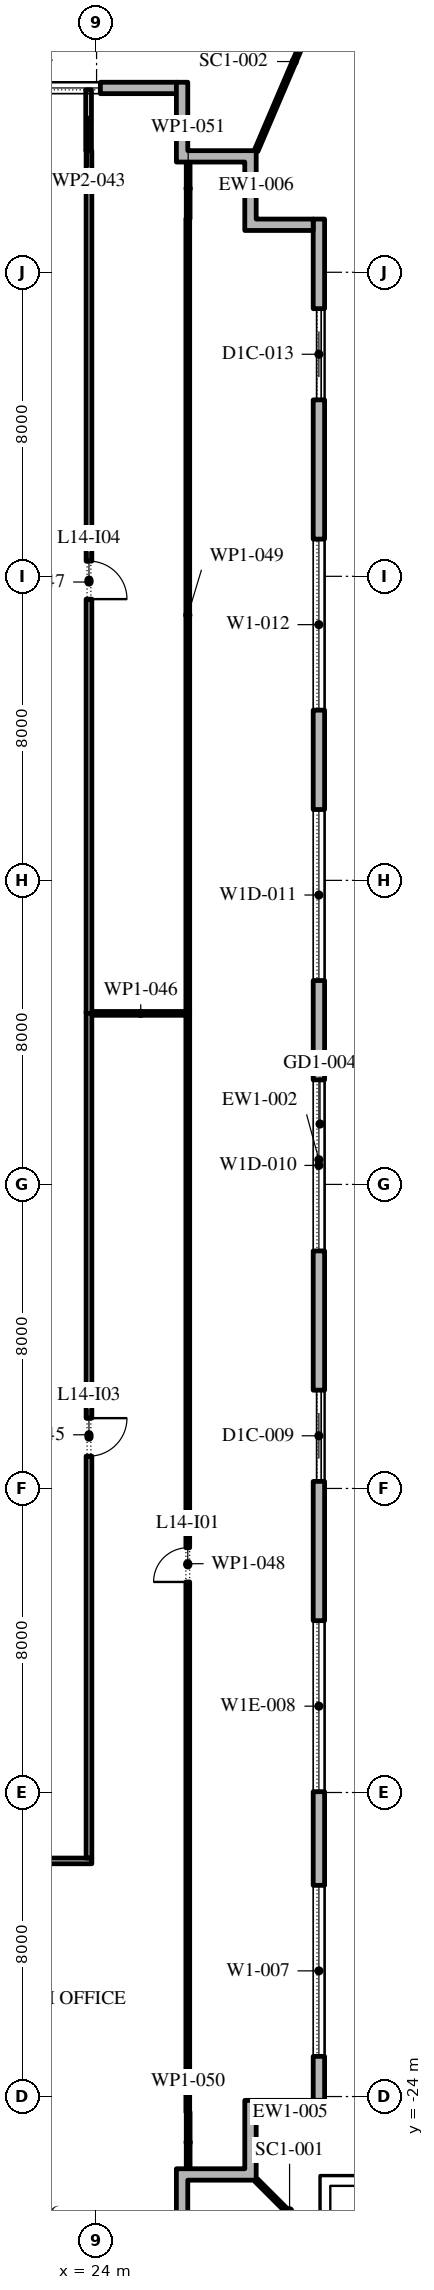
"""IFC4 building model, lengths in metres.
Left out: names, types, materials, properties, quantities, classifications, styles, units other than length and angle.
Written with IfcOpenShell. Run it as: python <this file> out.ifc"""

import sys

from ifc_helpers import new_model, si_unit, direction, frame, frame_2d, origin, place, context, subcontext, project, spatial, polyline, rectangle, outline, extrude, element, fill, save


model = new_model("IFC4")
c1 = context("Model", 3, precision=1e-05, world=origin(), true_north=direction((0.0, 1.0)))
c2 = subcontext(c1, "Body", "Model", "MODEL_VIEW")
j1 = project(units=[si_unit("LENGTHUNIT", "METRE"), si_unit("PLANEANGLEUNIT", "RADIAN")], contexts=[c1])
p1 = place(None, origin())
s1 = spatial("IfcSite", under=j1, at=p1, CompositionType="ELEMENT")
p2 = place(p1, origin())
s2 = spatial("IfcBuilding", under=s1, at=p2, CompositionType="ELEMENT")
p3 = place(p2, frame((0.0, 0.0, 69.0)))
s3 = spatial("IfcBuildingStorey", under=s2, at=p3, CompositionType="ELEMENT", Elevation=69.0)
p4 = place(p3, frame((29.85, -24.1, 0.0), z_axis=(0.0, 0.0, 1.0), x_axis=(0.0, 1.0, 0.0)))
e1 = element("IfcWall", 1, at=p4, inside=s3, PredefinedType="STANDARD", context=c2, shape_type="SweptSolid", body=[
    extrude(rectangle(XDim=49.5, YDim=0.3, at=frame_2d((24.75, 0.0))), origin(), (0.0, 0.0, 1.0), 4.0),
])
p5 = place(p4, frame((1.157, 0.0, 0.45)))
e2 = element("IfcOpeningElement", 2, at=p5, cuts=e1, PredefinedType="OPENING", context=c2, shape_type="SweptSolid", body=[
    extrude(rectangle(XDim=4.5, YDim=3.05, at=frame_2d((2.25, 1.525))), frame((0.0, 0.16, 0.0), z_axis=(0.0, -1.0, 0.0), x_axis=(1.0, 0.0, 0.0)), (0.0, 0.0, 1.0), 0.32),
])
p6 = place(p4, frame((8.121, 0.0, 0.45)))
e3 = element("IfcOpeningElement", 3, at=p6, cuts=e1, PredefinedType="OPENING", context=c2, shape_type="SweptSolid", body=[
    extrude(rectangle(XDim=4.5, YDim=2.825, at=frame_2d((2.25, 1.413))), frame((0.0, 0.16, 0.0), z_axis=(0.0, -1.0, 0.0), x_axis=(1.0, 0.0, 0.0)), (0.0, 0.0, 1.0), 0.32),
])
p7 = place(p4, frame((16.286, 0.0, 0.0)))
e4 = element("IfcOpeningElement", 4, at=p7, cuts=e1, PredefinedType="OPENING", context=c2, shape_type="SweptSolid", body=[
    extrude(rectangle(XDim=2.4, YDim=3.325, at=frame_2d((1.2, 1.663))), frame((0.0, 0.16, 0.0), z_axis=(0.0, -1.0, 0.0), x_axis=(1.0, 0.0, 0.0)), (0.0, 0.0, 1.0), 0.32),
])
p8 = place(p4, frame((22.35, 0.0, 0.45)))
e5 = element("IfcOpeningElement", 5, at=p8, cuts=e1, PredefinedType="OPENING", context=c2, shape_type="SweptSolid", body=[
    extrude(rectangle(XDim=4.5, YDim=2.875, at=frame_2d((2.25, 1.438))), frame((0.0, 0.16, 0.0), z_axis=(0.0, -1.0, 0.0), x_axis=(1.0, 0.0, 0.0)), (0.0, 0.0, 1.0), 0.32),
])
p9 = place(p4, frame((29.464, 0.0, 0.45)))
e6 = element("IfcOpeningElement", 6, at=p9, cuts=e1, PredefinedType="OPENING", context=c2, shape_type="SweptSolid", body=[
    extrude(rectangle(XDim=4.5, YDim=2.875, at=frame_2d((2.25, 1.438))), frame((0.0, 0.16, 0.0), z_axis=(0.0, -1.0, 0.0), x_axis=(1.0, 0.0, 0.0)), (0.0, 0.0, 1.0), 0.32),
])
p10 = place(p4, frame((36.579, 0.0, 0.45)))
e7 = element("IfcOpeningElement", 7, at=p10, cuts=e1, PredefinedType="OPENING", context=c2, shape_type="SweptSolid", body=[
    extrude(rectangle(XDim=4.5, YDim=3.05, at=frame_2d((2.25, 1.525))), frame((0.0, 0.16, 0.0), z_axis=(0.0, -1.0, 0.0), x_axis=(1.0, 0.0, 0.0)), (0.0, 0.0, 1.0), 0.32),
])
p11 = place(p4, frame((44.743, 0.0, 0.0)))
e8 = element("IfcOpeningElement", 8, at=p11, cuts=e1, PredefinedType="OPENING", context=c2, shape_type="SweptSolid", body=[
    extrude(rectangle(XDim=2.4, YDim=3.325, at=frame_2d((1.2, 1.663))), frame((0.0, 0.16, 0.0), z_axis=(0.0, -1.0, 0.0), x_axis=(1.0, 0.0, 0.0)), (0.0, 0.0, 1.0), 0.32),
])
p12 = place(p3, frame((26.1, 28.85, 0.0), z_axis=(0.0, 0.0, 1.0), x_axis=(-1.0, 0.0, 0.0)))
e9 = element("IfcWall", 9, at=p12, inside=s3, PredefinedType="STANDARD", context=c2, shape_type="SweptSolid", body=[
    extrude(rectangle(XDim=52.5, YDim=0.3, at=frame_2d((26.25, 0.0))), origin(), (0.0, 0.0, 1.0), 4.0),
])
p13 = place(p12, frame((2.0, 0.0, 0.45)))
e10 = element("IfcOpeningElement", 10, at=p13, cuts=e9, PredefinedType="OPENING", context=c2, shape_type="SweptSolid", body=[
    extrude(rectangle(XDim=4.5, YDim=2.95, at=frame_2d((2.25, 1.475))), frame((0.0, 0.16, 0.0), z_axis=(0.0, -1.0, 0.0), x_axis=(1.0, 0.0, 0.0)), (0.0, 0.0, 1.0), 0.32),
])
p14 = place(p12, frame((10.65, 0.0, 0.45)))
e11 = element("IfcOpeningElement", 11, at=p14, cuts=e9, PredefinedType="OPENING", context=c2, shape_type="SweptSolid", body=[
    extrude(rectangle(XDim=4.5, YDim=2.95, at=frame_2d((2.25, 1.475))), frame((0.0, 0.16, 0.0), z_axis=(0.0, -1.0, 0.0), x_axis=(1.0, 0.0, 0.0)), (0.0, 0.0, 1.0), 0.32),
])
p15 = place(p12, frame((20.5, 0.0, 0.0)))
e12 = element("IfcOpeningElement", 12, at=p15, cuts=e9, PredefinedType="OPENING", context=c2, shape_type="SweptSolid", body=[
    extrude(rectangle(XDim=2.4, YDim=3.5, at=frame_2d((1.2, 1.75))), frame((0.0, 0.16, 0.0), z_axis=(0.0, -1.0, 0.0), x_axis=(1.0, 0.0, 0.0)), (0.0, 0.0, 1.0), 0.32),
])
p16 = place(p12, frame((28.25, 0.0, 0.45)))
e13 = element("IfcOpeningElement", 13, at=p16, cuts=e9, PredefinedType="OPENING", context=c2, shape_type="SweptSolid", body=[
    extrude(rectangle(XDim=4.5, YDim=2.95, at=frame_2d((2.25, 1.475))), frame((0.0, 0.16, 0.0), z_axis=(0.0, -1.0, 0.0), x_axis=(1.0, 0.0, 0.0)), (0.0, 0.0, 1.0), 0.32),
])
p17 = place(p12, frame((37.05, 0.0, 0.45)))
e14 = element("IfcOpeningElement", 14, at=p17, cuts=e9, PredefinedType="OPENING", context=c2, shape_type="SweptSolid", body=[
    extrude(rectangle(XDim=4.5, YDim=2.95, at=frame_2d((2.25, 1.475))), frame((0.0, 0.16, 0.0), z_axis=(0.0, -1.0, 0.0), x_axis=(1.0, 0.0, 0.0)), (0.0, 0.0, 1.0), 0.32),
])
p18 = place(p12, frame((45.85, 0.0, 0.45)))
e15 = element("IfcOpeningElement", 15, at=p18, cuts=e9, PredefinedType="OPENING", context=c2, shape_type="SweptSolid", body=[
    extrude(rectangle(XDim=4.5, YDim=2.95, at=frame_2d((2.25, 1.475))), frame((0.0, 0.16, 0.0), z_axis=(0.0, -1.0, 0.0), x_axis=(1.0, 0.0, 0.0)), (0.0, 0.0, 1.0), 0.32),
])
p19 = place(p3, origin())
e16 = element("IfcWall", 16, at=p19, inside=s3, PredefinedType="STANDARD", context=c2, shape_type="SweptSolid", body=[
    extrude(outline(polyline([(27.9, -25.9), (27.9, -24.1), (30.0, -24.1), (30.0, -24.4), (28.2, -24.4), (28.2, -26.2), (26.4, -26.2), (26.4, -27.7), (26.1, -27.7), (26.1, -25.9), (27.9, -25.9)])), origin(), (0.0, 0.0, 1.0), 4.0),
])
p20 = place(p3, origin())
e17 = element("IfcWall", 17, at=p20, inside=s3, PredefinedType="STANDARD", context=c2, shape_type="SweptSolid", body=[
    extrude(outline(polyline([(27.9, 26.9), (26.1, 26.9), (26.1, 29.0), (26.4, 29.0), (26.4, 27.2), (28.2, 27.2), (28.2, 25.4), (29.7, 25.4), (29.7, 25.1), (27.9, 25.1), (27.9, 26.9)])), origin(), (0.0, 0.0, 1.0), 4.0),
])
p21 = place(p3, frame((28.2, -26.2, -0.05), z_axis=(0.0, 0.0, 1.0), x_axis=(0.707106781187, -0.707106781187, 0.0)))
e18 = element("IfcWall", 18, at=p21, inside=s3, PredefinedType="STANDARD", context=c2, shape_type="SweptSolid", body=[
    extrude(rectangle(XDim=2.385, YDim=0.1, at=frame_2d((1.192, 0.0))), origin(), (0.0, 0.0, 1.0), 4.05),
])
p22 = place(p3, frame((28.2, 27.2, -0.05), z_axis=(0.0, 0.0, 1.0), x_axis=(0.392826940341, 0.919612415609, 0.0)))
e19 = element("IfcWall", 19, at=p22, inside=s3, PredefinedType="STANDARD", context=c2, shape_type="SweptSolid", body=[
    extrude(rectangle(XDim=5.099, YDim=0.1, at=frame_2d((2.55, 0.0))), origin(), (0.0, 0.0, 1.0), 4.05),
])
p23 = place(p3, frame((23.79, 28.8, 0.0), z_axis=(0.0, 0.0, 1.0), x_axis=(0.0, -1.0, 0.0)))
e20 = element("IfcWall", 20, at=p23, inside=s3, PredefinedType="PARTITIONING", context=c2, shape_type="SweptSolid", body=[
    extrude(rectangle(XDim=1.6, YDim=0.15, at=frame_2d((0.8, 0.0))), origin(), (0.0, 0.0, 1.0), 4.0),
])
p24 = place(p3, frame((23.875, -17.8, 0.0), z_axis=(0.0, 0.0, 1.0), x_axis=(-1.0, 0.0, 0.0)))
e21 = element("IfcWall", 21, at=p24, inside=s3, PredefinedType="PARTITIONING", context=c2, shape_type="SweptSolid", body=[
    extrude(rectangle(XDim=6.275, YDim=0.15, at=frame_2d((3.137, 0.0))), origin(), (0.0, 0.0, 1.0), 4.0),
])
p25 = place(p3, frame((23.8, 4.55, 0.0), z_axis=(0.0, 0.0, 1.0), x_axis=(0.0, -1.0, 0.0)))
e22 = element("IfcWall", 22, at=p25, inside=s3, PredefinedType="PARTITIONING", context=c2, shape_type="SweptSolid", body=[
    extrude(rectangle(XDim=22.275, YDim=0.15, at=frame_2d((11.138, 0.0))), origin(), (0.0, 0.0, 1.0), 4.0),
])
p26 = place(p25, frame((10.7, 0.0, 0.0)))
e23 = element("IfcOpeningElement", 23, at=p26, cuts=e22, PredefinedType="OPENING", context=c2, shape_type="SweptSolid", body=[
    extrude(rectangle(XDim=1.0, YDim=2.1, at=frame_2d((0.5, 1.05))), frame((0.0, 0.085, 0.0), z_axis=(0.0, -1.0, 0.0), x_axis=(1.0, 0.0, 0.0)), (0.0, 0.0, 1.0), 0.17),
])
p27 = place(p3, frame((23.875, 4.5, 0.0), z_axis=(0.0, 0.0, 1.0), x_axis=(1.0, 0.0, 0.0)))
e24 = element("IfcWall", 24, at=p27, inside=s3, PredefinedType="PARTITIONING", context=c2, shape_type="SweptSolid", body=[
    extrude(rectangle(XDim=2.575, YDim=0.1, at=frame_2d((1.288, 0.0))), origin(), (0.0, 0.0, 1.0), 4.0),
])
p28 = place(p3, frame((23.8, 27.2, 0.0), z_axis=(0.0, 0.0, 1.0), x_axis=(0.0, -1.0, 0.0)))
e25 = element("IfcWall", 25, at=p28, inside=s3, PredefinedType="PARTITIONING", context=c2, shape_type="SweptSolid", body=[
    extrude(rectangle(XDim=22.7, YDim=0.15, at=frame_2d((11.35, 0.0))), origin(), (0.0, 0.0, 1.0), 4.0),
])
p29 = place(p28, frame((10.8, 0.0, 0.0)))
e26 = element("IfcOpeningElement", 26, at=p29, cuts=e25, PredefinedType="OPENING", context=c2, shape_type="SweptSolid", body=[
    extrude(rectangle(XDim=1.0, YDim=2.1, at=frame_2d((0.5, 1.05))), frame((0.0, 0.085, 0.0), z_axis=(0.0, -1.0, 0.0), x_axis=(1.0, 0.0, 0.0)), (0.0, 0.0, 1.0), 0.17),
])
p30 = place(p3, frame((26.4, -24.41, 0.0), z_axis=(0.0, 0.0, 1.0), x_axis=(0.0, 1.0, 0.0)))
e27 = element("IfcWall", 27, at=p30, inside=s3, PredefinedType="PARTITIONING", context=c2, shape_type="SweptSolid", body=[
    extrude(rectangle(XDim=28.86, YDim=0.1, at=frame_2d((14.43, 0.0))), origin(), (0.0, 0.0, 1.0), 4.0),
])
p31 = place(p30, frame((13.95, 0.0, 0.0)))
e28 = element("IfcOpeningElement", 28, at=p31, cuts=e27, PredefinedType="OPENING", context=c2, shape_type="SweptSolid", body=[
    extrude(rectangle(XDim=0.9, YDim=2.1, at=frame_2d((0.45, 1.05))), frame((0.0, 0.06, 0.0), z_axis=(0.0, -1.0, 0.0), x_axis=(1.0, 0.0, 0.0)), (0.0, 0.0, 1.0), 0.12),
])
p32 = place(p3, frame((26.4, 4.55, 0.0), z_axis=(0.0, 0.0, 1.0), x_axis=(0.0, 1.0, 0.0)))
e29 = element("IfcWall", 29, at=p32, inside=s3, PredefinedType="PARTITIONING", context=c2, shape_type="SweptSolid", body=[
    extrude(rectangle(XDim=20.86, YDim=0.1, at=frame_2d((10.43, 0.0))), origin(), (0.0, 0.0, 1.0), 4.0),
])
for number, where, z_axis, x_axis in (
    (30, (26.41, -26.0, 0.0), (0.0, 0.0, 1.0), (0.0, 1.0, 0.0)),
    (31, (26.41, 25.41, 0.0), (0.0, 0.0, 1.0), (0.0, 1.0, 0.0)),
):
    element("IfcWall", number, at=place(p3, frame(where, z_axis=z_axis, x_axis=x_axis)), inside=s3, PredefinedType="PARTITIONING", context=c2, shape_type="SweptSolid", body=[
        extrude(rectangle(XDim=1.59, YDim=0.1, at=frame_2d((0.795, 0.0))), origin(), (0.0, 0.0, 1.0), 4.0),
    ])
p33 = place(p5, origin())
e32 = element("IfcWindow", 32, at=p33, inside=s3, PartitioningType="DOUBLE_PANEL_VERTICAL", PredefinedType="WINDOW", context=c2, shape_type="SweptSolid", body=[
    extrude(rectangle(XDim=4.5, YDim=3.05, at=frame_2d((2.25, 1.525))), frame((0.0, 0.03, 0.0), z_axis=(0.0, -1.0, 0.0), x_axis=(1.0, 0.0, 0.0)), (0.0, 0.0, 1.0), 0.06),
])
fill(e2, e32)
p34 = place(p6, origin())
e33 = element("IfcWindow", 33, at=p34, inside=s3, PartitioningType="DOUBLE_PANEL_VERTICAL", PredefinedType="WINDOW", context=c2, shape_type="SweptSolid", body=[
    extrude(rectangle(XDim=4.5, YDim=2.825, at=frame_2d((2.25, 1.413))), frame((0.0, 0.03, 0.0), z_axis=(0.0, -1.0, 0.0), x_axis=(1.0, 0.0, 0.0)), (0.0, 0.0, 1.0), 0.06),
])
fill(e3, e33)
p35 = place(p7, origin())
e34 = element("IfcDoor", 34, at=p35, inside=s3, OperationType="DOUBLE_DOOR_SLIDING", PredefinedType="DOOR", context=c2, shape_type="SweptSolid", body=[
    extrude(rectangle(XDim=2.4, YDim=3.325, at=frame_2d((1.2, 1.663))), frame((0.0, 0.025, 0.0), z_axis=(0.0, -1.0, 0.0), x_axis=(1.0, 0.0, 0.0)), (0.0, 0.0, 1.0), 0.05),
])
fill(e4, e34)
p36 = place(p8, origin())
e35 = element("IfcWindow", 35, at=p36, inside=s3, PartitioningType="DOUBLE_PANEL_VERTICAL", PredefinedType="WINDOW", context=c2, shape_type="SweptSolid", body=[
    extrude(rectangle(XDim=4.5, YDim=2.875, at=frame_2d((2.25, 1.438))), frame((0.0, 0.03, 0.0), z_axis=(0.0, -1.0, 0.0), x_axis=(1.0, 0.0, 0.0)), (0.0, 0.0, 1.0), 0.06),
])
fill(e5, e35)
p37 = place(p9, origin())
e36 = element("IfcWindow", 36, at=p37, inside=s3, PartitioningType="DOUBLE_PANEL_VERTICAL", PredefinedType="WINDOW", context=c2, shape_type="SweptSolid", body=[
    extrude(rectangle(XDim=4.5, YDim=2.875, at=frame_2d((2.25, 1.438))), frame((0.0, 0.03, 0.0), z_axis=(0.0, -1.0, 0.0), x_axis=(1.0, 0.0, 0.0)), (0.0, 0.0, 1.0), 0.06),
])
fill(e6, e36)
p38 = place(p10, origin())
e37 = element("IfcWindow", 37, at=p38, inside=s3, PartitioningType="DOUBLE_PANEL_VERTICAL", PredefinedType="WINDOW", context=c2, shape_type="SweptSolid", body=[
    extrude(rectangle(XDim=4.5, YDim=3.05, at=frame_2d((2.25, 1.525))), frame((0.0, 0.03, 0.0), z_axis=(0.0, -1.0, 0.0), x_axis=(1.0, 0.0, 0.0)), (0.0, 0.0, 1.0), 0.06),
])
fill(e7, e37)
p39 = place(p11, origin())
e38 = element("IfcDoor", 38, at=p39, inside=s3, OperationType="DOUBLE_DOOR_SLIDING", PredefinedType="DOOR", context=c2, shape_type="SweptSolid", body=[
    extrude(rectangle(XDim=2.4, YDim=3.325, at=frame_2d((1.2, 1.663))), frame((0.0, 0.025, 0.0), z_axis=(0.0, -1.0, 0.0), x_axis=(1.0, 0.0, 0.0)), (0.0, 0.0, 1.0), 0.05),
])
fill(e8, e38)
p40 = place(p13, origin())
e39 = element("IfcWindow", 39, at=p40, inside=s3, PartitioningType="DOUBLE_PANEL_VERTICAL", PredefinedType="WINDOW", context=c2, shape_type="SweptSolid", body=[
    extrude(rectangle(XDim=4.5, YDim=2.95, at=frame_2d((2.25, 1.475))), frame((0.0, 0.03, 0.0), z_axis=(0.0, -1.0, 0.0), x_axis=(1.0, 0.0, 0.0)), (0.0, 0.0, 1.0), 0.06),
])
fill(e10, e39)
p41 = place(p31, origin())
e40 = element("IfcDoor", 40, at=p41, inside=s3, OperationType="SINGLE_SWING_RIGHT", PredefinedType="DOOR", context=c2, shape_type="SweptSolid", body=[
    extrude(rectangle(XDim=0.9, YDim=2.1, at=frame_2d((0.45, 1.05))), frame((0.0, 0.025, 0.0), z_axis=(0.0, -1.0, 0.0), x_axis=(1.0, 0.0, 0.0)), (0.0, 0.0, 1.0), 0.05),
])
fill(e28, e40)
p42 = place(p26, origin())
e41 = element("IfcDoor", 41, at=p42, inside=s3, OperationType="SINGLE_SWING_RIGHT", PredefinedType="DOOR", context=c2, shape_type="SweptSolid", body=[
    extrude(rectangle(XDim=1.0, YDim=2.1, at=frame_2d((0.5, 1.05))), frame((0.0, 0.025, 0.0), z_axis=(0.0, -1.0, 0.0), x_axis=(1.0, 0.0, 0.0)), (0.0, 0.0, 1.0), 0.05),
])
fill(e23, e41)
p43 = place(p29, origin())
e42 = element("IfcDoor", 42, at=p43, inside=s3, OperationType="SINGLE_SWING_LEFT", PredefinedType="DOOR", context=c2, shape_type="SweptSolid", body=[
    extrude(rectangle(XDim=1.0, YDim=2.1, at=frame_2d((0.5, 1.05))), frame((0.0, 0.025, 0.0), z_axis=(0.0, -1.0, 0.0), x_axis=(1.0, 0.0, 0.0)), (0.0, 0.0, 1.0), 0.05),
])
fill(e26, e42)
save(model, sys.argv[1])
